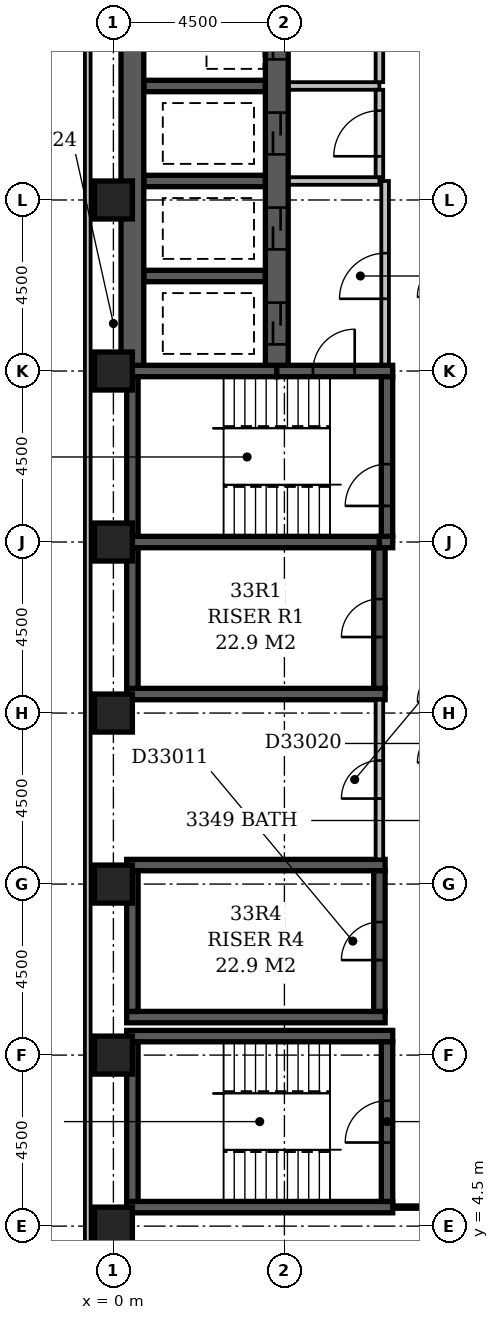
"""IFC4 building model, lengths in metres.
Left out: names, types, materials, properties, quantities, classifications, styles, units other than length and angle.
Written with IfcOpenShell. Run it as: python <this file> out.ifc"""

import sys

from ifc_helpers import new_model, si_unit, direction, frame, frame_2d, origin, origin_2d, place, context, subcontext, project, spatial, rectangle, extrude, element, fill, save


model = new_model("IFC4")
c1 = context("Model", 3, precision=1e-05, world=origin(), true_north=direction((0.0, 1.0)))
c2 = subcontext(c1, "Body", "Model", "MODEL_VIEW")
j1 = project(units=[si_unit("LENGTHUNIT", "METRE"), si_unit("PLANEANGLEUNIT", "RADIAN")], contexts=[c1])
p1 = place(None, origin())
s1 = spatial("IfcSite", under=j1, at=p1, CompositionType="ELEMENT")
p2 = place(p1, origin())
s2 = spatial("IfcBuilding", under=s1, at=p2, CompositionType="ELEMENT")
p3 = place(p2, frame((0.0, 0.0, 134.0)))
s3 = spatial("IfcBuildingStorey", under=s2, at=p3, CompositionType="ELEMENT", Elevation=134.0)
for number, where, z_axis, x_axis in (
    (1, (0.35, 5.0, -0.3), (0.0, 0.0, 1.0), (1.0, 0.0, 0.0)),
    (2, (0.35, 9.5, -0.3), (0.0, 0.0, 1.0), (1.0, 0.0, 0.0)),
):
    element("IfcWall", number, at=place(p3, frame(where, z_axis=z_axis, x_axis=x_axis)), inside=s3, PredefinedType="SHEAR", context=c2, shape_type="SweptSolid", body=[
        extrude(rectangle(XDim=7.0, YDim=0.3, at=frame_2d((3.5, 0.0))), origin(), (0.0, 0.0, 1.0), 3.6),
    ])
for number, where, z_axis, x_axis in (
    (3, (0.35, 10.0, -0.3), (0.0, 0.0, 1.0), (1.0, 0.0, 0.0)),
    (4, (0.35, 14.0, -0.3), (0.0, 0.0, 1.0), (1.0, 0.0, 0.0)),
    (5, (0.35, 18.5, -0.3), (0.0, 0.0, 1.0), (1.0, 0.0, 0.0)),
):
    element("IfcWall", number, at=place(p3, frame(where, z_axis=z_axis, x_axis=x_axis)), inside=s3, PredefinedType="SHEAR", context=c2, shape_type="SweptSolid", body=[
        extrude(rectangle(XDim=6.8, YDim=0.3, at=frame_2d((3.4, 0.0))), origin(), (0.0, 0.0, 1.0), 3.6),
    ])
p4 = place(p3, frame((0.35, 22.5, -0.3), z_axis=(0.0, 0.0, 1.0), x_axis=(1.0, 0.0, 0.0)))
e6 = element("IfcWall", 6, at=p4, inside=s3, PredefinedType="SHEAR", context=c2, shape_type="SweptSolid", body=[
    extrude(rectangle(XDim=6.65, YDim=0.3, at=frame_2d((3.325, 0.0))), origin(), (0.0, 0.0, 1.0), 3.6),
])
p5 = place(p3, frame((0.35, 27.0, -0.3), z_axis=(0.0, 0.0, 1.0), x_axis=(1.0, 0.0, 0.0)))
e7 = element("IfcWall", 7, at=p5, inside=s3, PredefinedType="SHEAR", context=c2, shape_type="SweptSolid", body=[
    extrude(rectangle(XDim=3.95, YDim=0.3, at=frame_2d((1.975, 0.0))), origin(), (0.0, 0.0, 1.0), 3.6),
])
p6 = place(p3, frame((0.5, 5.15, -0.3), z_axis=(0.0, 0.0, 1.0), x_axis=(0.0, 1.0, 0.0)))
e8 = element("IfcWall", 8, at=p6, inside=s3, PredefinedType="SHEAR", context=c2, shape_type="SweptSolid", body=[
    extrude(rectangle(XDim=4.2, YDim=0.3, at=frame_2d((2.1, 0.0))), origin(), (0.0, 0.0, 1.0), 3.6),
])
for number, where, z_axis, x_axis in (
    (9, (0.5, 10.15, -0.3), (0.0, 0.0, 1.0), (0.0, 1.0, 0.0)),
    (10, (0.5, 18.65, -0.3), (0.0, 0.0, 1.0), (0.0, 1.0, 0.0)),
):
    element("IfcWall", number, at=place(p3, frame(where, z_axis=z_axis, x_axis=x_axis)), inside=s3, PredefinedType="SHEAR", context=c2, shape_type="SweptSolid", body=[
        extrude(rectangle(XDim=3.7, YDim=0.3, at=frame_2d((1.85, 0.0))), origin(), (0.0, 0.0, 1.0), 3.6),
    ])
p7 = place(p3, frame((0.5, 22.65, -0.3), z_axis=(0.0, 0.0, 1.0), x_axis=(0.0, 1.0, 0.0)))
e11 = element("IfcWall", 11, at=p7, inside=s3, PredefinedType="SHEAR", context=c2, shape_type="SweptSolid", body=[
    extrude(rectangle(XDim=4.2, YDim=0.3, at=frame_2d((2.1, 0.0))), origin(), (0.0, 0.0, 1.0), 3.6),
])
p8 = place(p3, frame((0.5, 27.15, -0.3), z_axis=(0.0, 0.0, 1.0), x_axis=(0.0, 1.0, 0.0)))
e12 = element("IfcWall", 12, at=p8, inside=s3, PredefinedType="SHEAR", context=c2, shape_type="SweptSolid", body=[
    extrude(rectangle(XDim=22.05, YDim=0.6, at=frame_2d((11.025, 0.0))), origin(), (0.0, 0.0, 1.0), 3.6),
])
for number, where, z_axis, x_axis in (
    (13, (0.8, 29.5, -0.3), (0.0, 0.0, 1.0), (1.0, 0.0, 0.0)),
    (14, (0.8, 32.0, -0.3), (0.0, 0.0, 1.0), (1.0, 0.0, 0.0)),
    (15, (0.8, 34.5, -0.3), (0.0, 0.0, 1.0), (1.0, 0.0, 0.0)),
):
    element("IfcWall", number, at=place(p3, frame(where, z_axis=z_axis, x_axis=x_axis)), inside=s3, PredefinedType="SHEAR", context=c2, shape_type="SweptSolid", body=[
        extrude(rectangle(XDim=3.2, YDim=0.3, at=frame_2d((1.6, 0.0))), origin(), (0.0, 0.0, 1.0), 3.6),
    ])
p9 = place(p3, frame((4.3, 27.0, -0.3), z_axis=(0.0, 0.0, 1.0), x_axis=(1.0, 0.0, 0.0)))
e16 = element("IfcWall", 16, at=p9, inside=s3, PredefinedType="SHEAR", context=c2, shape_type="SweptSolid", body=[
    extrude(rectangle(XDim=3.05, YDim=0.3, at=frame_2d((1.525, 0.0))), origin(), (0.0, 0.0, 1.0), 3.6),
])
p10 = place(p9, frame((0.95, 0.0, 0.3)))
e17 = element("IfcOpeningElement", 17, at=p10, cuts=e16, PredefinedType="OPENING", context=c2, shape_type="SweptSolid", body=[
    extrude(rectangle(XDim=1.1, YDim=2.1, at=frame_2d((0.55, 1.05))), frame((0.0, 0.162, 0.0), z_axis=(0.0, -1.0, 0.0), x_axis=(1.0, 0.0, 0.0)), (0.0, 0.0, 1.0), 0.324),
])
p11 = place(p3, frame((4.3, 27.15, -0.3), z_axis=(0.0, 0.0, 1.0), x_axis=(0.0, 1.0, 0.0)))
e18 = element("IfcWall", 18, at=p11, inside=s3, PredefinedType="SHEAR", context=c2, shape_type="SweptSolid", body=[
    extrude(rectangle(XDim=22.05, YDim=0.6, at=frame_2d((11.025, 0.0))), origin(), (0.0, 0.0, 1.0), 3.6),
])
p12 = place(p11, frame((3.05, 0.0, 0.3)))
e19 = element("IfcOpeningElement", 19, at=p12, cuts=e18, PredefinedType="OPENING", context=c2, shape_type="SweptSolid", body=[
    extrude(rectangle(XDim=1.1, YDim=2.1, at=frame_2d((0.55, 1.05))), frame((0.0, 0.312, 0.0), z_axis=(0.0, -1.0, 0.0), x_axis=(1.0, 0.0, 0.0)), (0.0, 0.0, 1.0), 0.624),
])
p13 = place(p11, frame((0.55, 0.0, 0.3)))
e20 = element("IfcOpeningElement", 20, at=p13, cuts=e18, PredefinedType="OPENING", context=c2, shape_type="SweptSolid", body=[
    extrude(rectangle(XDim=1.1, YDim=2.1, at=frame_2d((0.55, 1.05))), frame((0.0, 0.312, 0.0), z_axis=(0.0, -1.0, 0.0), x_axis=(1.0, 0.0, 0.0)), (0.0, 0.0, 1.0), 0.624),
])
p14 = place(p11, frame((20.55, 0.0, 0.3)))
e21 = element("IfcOpeningElement", 21, at=p14, cuts=e18, PredefinedType="OPENING", context=c2, shape_type="SweptSolid", body=[
    extrude(rectangle(XDim=1.1, YDim=2.1, at=frame_2d((0.55, 1.05))), frame((0.0, 0.312, 0.0), z_axis=(0.0, -1.0, 0.0), x_axis=(1.0, 0.0, 0.0)), (0.0, 0.0, 1.0), 0.624),
])
p15 = place(p11, frame((18.05, 0.0, 0.3)))
e22 = element("IfcOpeningElement", 22, at=p15, cuts=e18, PredefinedType="OPENING", context=c2, shape_type="SweptSolid", body=[
    extrude(rectangle(XDim=1.1, YDim=2.1, at=frame_2d((0.55, 1.05))), frame((0.0, 0.312, 0.0), z_axis=(0.0, -1.0, 0.0), x_axis=(1.0, 0.0, 0.0)), (0.0, 0.0, 1.0), 0.624),
])
p16 = place(p11, frame((15.55, 0.0, 0.3)))
e23 = element("IfcOpeningElement", 23, at=p16, cuts=e18, PredefinedType="OPENING", context=c2, shape_type="SweptSolid", body=[
    extrude(rectangle(XDim=1.1, YDim=2.1, at=frame_2d((0.55, 1.05))), frame((0.0, 0.312, 0.0), z_axis=(0.0, -1.0, 0.0), x_axis=(1.0, 0.0, 0.0)), (0.0, 0.0, 1.0), 0.624),
])
p17 = place(p11, frame((13.05, 0.0, 0.3)))
e24 = element("IfcOpeningElement", 24, at=p17, cuts=e18, PredefinedType="OPENING", context=c2, shape_type="SweptSolid", body=[
    extrude(rectangle(XDim=1.1, YDim=2.1, at=frame_2d((0.55, 1.05))), frame((0.0, 0.312, 0.0), z_axis=(0.0, -1.0, 0.0), x_axis=(1.0, 0.0, 0.0)), (0.0, 0.0, 1.0), 0.624),
])
p18 = place(p11, frame((10.55, 0.0, 0.3)))
e25 = element("IfcOpeningElement", 25, at=p18, cuts=e18, PredefinedType="OPENING", context=c2, shape_type="SweptSolid", body=[
    extrude(rectangle(XDim=1.1, YDim=2.1, at=frame_2d((0.55, 1.05))), frame((0.0, 0.312, 0.0), z_axis=(0.0, -1.0, 0.0), x_axis=(1.0, 0.0, 0.0)), (0.0, 0.0, 1.0), 0.624),
])
p19 = place(p11, frame((8.05, 0.0, 0.3)))
e26 = element("IfcOpeningElement", 26, at=p19, cuts=e18, PredefinedType="OPENING", context=c2, shape_type="SweptSolid", body=[
    extrude(rectangle(XDim=1.1, YDim=2.1, at=frame_2d((0.55, 1.05))), frame((0.0, 0.312, 0.0), z_axis=(0.0, -1.0, 0.0), x_axis=(1.0, 0.0, 0.0)), (0.0, 0.0, 1.0), 0.624),
])
p20 = place(p11, frame((5.55, 0.0, 0.3)))
e27 = element("IfcOpeningElement", 27, at=p20, cuts=e18, PredefinedType="OPENING", context=c2, shape_type="SweptSolid", body=[
    extrude(rectangle(XDim=1.1, YDim=2.1, at=frame_2d((0.55, 1.05))), frame((0.0, 0.312, 0.0), z_axis=(0.0, -1.0, 0.0), x_axis=(1.0, 0.0, 0.0)), (0.0, 0.0, 1.0), 0.624),
])
p21 = place(p3, frame((7.0, 10.15, -0.3), z_axis=(0.0, 0.0, 1.0), x_axis=(0.0, 1.0, 0.0)))
e28 = element("IfcWall", 28, at=p21, inside=s3, PredefinedType="SHEAR", context=c2, shape_type="SweptSolid", body=[
    extrude(rectangle(XDim=3.7, YDim=0.3, at=frame_2d((1.85, 0.0))), origin(), (0.0, 0.0, 1.0), 3.6),
])
p22 = place(p21, frame((1.35, 0.0, 0.3)))
e29 = element("IfcOpeningElement", 29, at=p22, cuts=e28, PredefinedType="OPENING", context=c2, shape_type="SweptSolid", body=[
    extrude(rectangle(XDim=1.0, YDim=2.1, at=frame_2d((0.5, 1.05))), frame((0.0, 0.162, 0.0), z_axis=(0.0, -1.0, 0.0), x_axis=(1.0, 0.0, 0.0)), (0.0, 0.0, 1.0), 0.324),
])
p23 = place(p3, frame((7.0, 18.65, -0.3), z_axis=(0.0, 0.0, 1.0), x_axis=(0.0, 1.0, 0.0)))
e30 = element("IfcWall", 30, at=p23, inside=s3, PredefinedType="SHEAR", context=c2, shape_type="SweptSolid", body=[
    extrude(rectangle(XDim=3.7, YDim=0.3, at=frame_2d((1.85, 0.0))), origin(), (0.0, 0.0, 1.0), 3.6),
])
p24 = place(p23, frame((1.35, 0.0, 0.3)))
e31 = element("IfcOpeningElement", 31, at=p24, cuts=e30, PredefinedType="OPENING", context=c2, shape_type="SweptSolid", body=[
    extrude(rectangle(XDim=1.0, YDim=2.1, at=frame_2d((0.5, 1.05))), frame((0.0, 0.162, 0.0), z_axis=(0.0, -1.0, 0.0), x_axis=(1.0, 0.0, 0.0)), (0.0, 0.0, 1.0), 0.324),
])
p25 = place(p3, frame((7.0, 22.5, -0.3), z_axis=(0.0, 0.0, 1.0), x_axis=(1.0, 0.0, 0.0)))
e32 = element("IfcWall", 32, at=p25, inside=s3, PredefinedType="SHEAR", context=c2, shape_type="SweptSolid", body=[
    extrude(rectangle(XDim=0.35, YDim=0.3, at=frame_2d((0.175, 0.0))), origin(), (0.0, 0.0, 1.0), 3.6),
])
p26 = place(p3, frame((7.2, 5.15, -0.3), z_axis=(0.0, 0.0, 1.0), x_axis=(0.0, 1.0, 0.0)))
e33 = element("IfcWall", 33, at=p26, inside=s3, PredefinedType="SHEAR", context=c2, shape_type="SweptSolid", body=[
    extrude(rectangle(XDim=4.2, YDim=0.3, at=frame_2d((2.1, 0.0))), origin(), (0.0, 0.0, 1.0), 3.6),
])
p27 = place(p26, frame((1.55, 0.0, 0.3)))
e34 = element("IfcOpeningElement", 34, at=p27, cuts=e33, PredefinedType="OPENING", context=c2, shape_type="SweptSolid", body=[
    extrude(rectangle(XDim=1.1, YDim=2.1, at=frame_2d((0.55, 1.05))), frame((0.0, 0.162, 0.0), z_axis=(0.0, -1.0, 0.0), x_axis=(1.0, 0.0, 0.0)), (0.0, 0.0, 1.0), 0.324),
])
p28 = place(p3, frame((7.2, 22.65, -0.3), z_axis=(0.0, 0.0, 1.0), x_axis=(0.0, 1.0, 0.0)))
e35 = element("IfcWall", 35, at=p28, inside=s3, PredefinedType="SHEAR", context=c2, shape_type="SweptSolid", body=[
    extrude(rectangle(XDim=4.2, YDim=0.3, at=frame_2d((2.1, 0.0))), origin(), (0.0, 0.0, 1.0), 3.6),
])
p29 = place(p28, frame((0.8, 0.0, 0.3)))
e36 = element("IfcOpeningElement", 36, at=p29, cuts=e35, PredefinedType="OPENING", context=c2, shape_type="SweptSolid", body=[
    extrude(rectangle(XDim=1.1, YDim=2.1, at=frame_2d((0.55, 1.05))), frame((0.0, 0.162, 0.0), z_axis=(0.0, -1.0, 0.0), x_axis=(1.0, 0.0, 0.0)), (0.0, 0.0, 1.0), 0.324),
])
for number, where, z_axis, x_axis in (
    (37, (0.0, 4.5, -0.3), (0.0, 0.0, 1.0), (1.0, 0.0, 0.0)),
    (38, (0.0, 9.0, -0.3), (0.0, 0.0, 1.0), (1.0, 0.0, 0.0)),
    (39, (0.0, 13.5, -0.3), (0.0, 0.0, 1.0), (1.0, 0.0, 0.0)),
    (40, (0.0, 18.0, -0.3), (0.0, 0.0, 1.0), (1.0, 0.0, 0.0)),
    (41, (0.0, 22.5, -0.3), (0.0, 0.0, 1.0), (1.0, 0.0, 0.0)),
    (42, (0.0, 27.0, -0.3), (0.0, 0.0, 1.0), (1.0, 0.0, 0.0)),
    (43, (0.0, 31.5, -0.3), (0.0, 0.0, 1.0), (1.0, 0.0, 0.0)),
):
    element("IfcColumn", number, at=place(p3, frame(where, z_axis=z_axis, x_axis=x_axis)), inside=s3, PredefinedType="COLUMN", context=c2, shape_type="SweptSolid", body=[
        extrude(rectangle(XDim=1.0, YDim=1.0, at=origin_2d()), origin(), (0.0, 0.0, 1.0), 3.6),
    ])
p30 = place(p3, frame((-0.675, 59.1, 0.0), z_axis=(0.0, 0.0, 1.0), x_axis=(0.0, -1.0, 0.0)))
e44 = element("IfcWall", 44, at=p30, inside=s3, PredefinedType="STANDARD", context=c2, shape_type="SweptSolid", body=[
    extrude(rectangle(XDim=55.35, YDim=0.15, at=frame_2d((27.675, 0.0))), origin(), (0.0, 0.0, 1.0), 2.7),
])
p31 = place(p3, frame((4.62, 34.5, 0.0), z_axis=(0.0, 0.0, 1.0), x_axis=(1.0, 0.0, 0.0)))
e45 = element("IfcWall", 45, at=p31, inside=s3, PredefinedType="PARTITIONING", context=c2, shape_type="SweptSolid", body=[
    extrude(rectangle(XDim=2.38, YDim=0.2, at=frame_2d((1.19, 0.0))), origin(), (0.0, 0.0, 1.0), 3.3),
])
p32 = place(p3, frame((7.0, 34.6, 0.0), z_axis=(0.0, 0.0, 1.0), x_axis=(0.0, 1.0, 0.0)))
e46 = element("IfcWall", 46, at=p32, inside=s3, PredefinedType="PARTITIONING", context=c2, shape_type="SweptSolid", body=[
    extrude(rectangle(XDim=14.9, YDim=0.2, at=frame_2d((7.45, 0.0))), origin(), (0.0, 0.0, 1.0), 3.3),
])
p33 = place(p32, frame((2.8, 0.0, 0.0)))
e47 = element("IfcOpeningElement", 47, at=p33, cuts=e46, PredefinedType="OPENING", context=c2, shape_type="SweptSolid", body=[
    extrude(rectangle(XDim=1.2, YDim=2.1, at=frame_2d((0.6, 1.05))), frame((0.0, 0.112, 0.0), z_axis=(0.0, -1.0, 0.0), x_axis=(1.0, 0.0, 0.0)), (0.0, 0.0, 1.0), 0.224),
])
p34 = place(p32, frame((9.8, 0.0, 0.0)))
e48 = element("IfcOpeningElement", 48, at=p34, cuts=e46, PredefinedType="OPENING", context=c2, shape_type="SweptSolid", body=[
    extrude(rectangle(XDim=1.2, YDim=2.1, at=frame_2d((0.6, 1.05))), frame((0.0, 0.112, 0.0), z_axis=(0.0, -1.0, 0.0), x_axis=(1.0, 0.0, 0.0)), (0.0, 0.0, 1.0), 0.224),
])
p35 = place(p3, frame((4.62, 32.0, 0.0), z_axis=(0.0, 0.0, 1.0), x_axis=(1.0, 0.0, 0.0)))
e49 = element("IfcWall", 49, at=p35, inside=s3, PredefinedType="PARTITIONING", context=c2, shape_type="SweptSolid", body=[
    extrude(rectangle(XDim=2.38, YDim=0.2, at=frame_2d((1.19, 0.0))), origin(), (0.0, 0.0, 1.0), 3.3),
])
p36 = place(p3, frame((7.0, 32.1, 0.0), z_axis=(0.0, 0.0, 1.0), x_axis=(0.0, 1.0, 0.0)))
e50 = element("IfcWall", 50, at=p36, inside=s3, PredefinedType="PARTITIONING", context=c2, shape_type="SweptSolid", body=[
    extrude(rectangle(XDim=2.3, YDim=0.2, at=frame_2d((1.15, 0.0))), origin(), (0.0, 0.0, 1.0), 3.3),
])
p37 = place(p36, frame((0.55, 0.0, 0.0)))
e51 = element("IfcOpeningElement", 51, at=p37, cuts=e50, PredefinedType="OPENING", context=c2, shape_type="SweptSolid", body=[
    extrude(rectangle(XDim=1.2, YDim=2.1, at=frame_2d((0.6, 1.05))), frame((0.0, 0.112, 0.0), z_axis=(0.0, -1.0, 0.0), x_axis=(1.0, 0.0, 0.0)), (0.0, 0.0, 1.0), 0.224),
])
p38 = place(p3, frame((7.15, 27.17, 0.0), z_axis=(0.0, 0.0, 1.0), x_axis=(0.0, 1.0, 0.0)))
e52 = element("IfcWall", 52, at=p38, inside=s3, PredefinedType="PARTITIONING", context=c2, shape_type="SweptSolid", body=[
    extrude(rectangle(XDim=4.83, YDim=0.2, at=frame_2d((2.415, 0.0))), origin(), (0.0, 0.0, 1.0), 3.3),
])
p39 = place(p38, frame((1.73, 0.0, 0.0)))
e53 = element("IfcOpeningElement", 53, at=p39, cuts=e52, PredefinedType="OPENING", context=c2, shape_type="SweptSolid", body=[
    extrude(rectangle(XDim=1.2, YDim=2.1, at=frame_2d((0.6, 1.05))), frame((0.0, 0.112, 0.0), z_axis=(0.0, -1.0, 0.0), x_axis=(1.0, 0.0, 0.0)), (0.0, 0.0, 1.0), 0.224),
])
p40 = place(p3, frame((0.0, 4.5, 0.0), z_axis=(0.0, 0.0, 1.0), x_axis=(0.0, 1.0, 0.0)))
e54 = element("IfcWall", 54, at=p40, inside=s3, PredefinedType="PARTITIONING", context=c2, shape_type="SweptSolid", body=[
    extrude(rectangle(XDim=0.5, YDim=0.1, at=frame_2d((0.25, 0.0))), origin(), (0.0, 0.0, 1.0), 2.7),
])
p41 = place(p3, frame((7.349, 5.0, 0.0), z_axis=(0.0, 0.0, 1.0), x_axis=(1.0, 0.0, 0.0)))
e55 = element("IfcWall", 55, at=p41, inside=s3, PredefinedType="PARTITIONING", context=c2, shape_type="SweptSolid", body=[
    extrude(rectangle(XDim=1.551, YDim=0.1, at=frame_2d((0.775, 0.0))), origin(), (0.0, 0.0, 1.0), 3.3),
])
p42 = place(p3, frame((7.0, 14.15, 0.0), z_axis=(0.0, 0.0, 1.0), x_axis=(0.0, 1.0, 0.0)))
e56 = element("IfcWall", 56, at=p42, inside=s3, PredefinedType="PARTITIONING", context=c2, shape_type="SweptSolid", body=[
    extrude(rectangle(XDim=4.2, YDim=0.2, at=frame_2d((2.1, 0.0))), origin(), (0.0, 0.0, 1.0), 3.3),
])
p43 = place(p42, frame((1.6, 0.0, 0.0)))
e57 = element("IfcOpeningElement", 57, at=p43, cuts=e56, PredefinedType="OPENING", context=c2, shape_type="SweptSolid", body=[
    extrude(rectangle(XDim=1.0, YDim=2.1, at=frame_2d((0.5, 1.05))), frame((0.0, 0.112, 0.0), z_axis=(0.0, -1.0, 0.0), x_axis=(1.0, 0.0, 0.0)), (0.0, 0.0, 1.0), 0.224),
])
p44 = place(p39, origin())
e58 = element("IfcDoor", 58, at=p44, inside=s3, OperationType="SINGLE_SWING_LEFT", PredefinedType="DOOR", context=c2, shape_type="SweptSolid", body=[
    extrude(rectangle(XDim=1.2, YDim=2.1, at=frame_2d((0.6, 1.05))), frame((0.0, 0.025, 0.0), z_axis=(0.0, -1.0, 0.0), x_axis=(1.0, 0.0, 0.0)), (0.0, 0.0, 1.0), 0.05),
])
fill(e53, e58)
p45 = place(p12, origin())
e59 = element("IfcDoor", 59, at=p45, inside=s3, OperationType="SLIDING_TO_LEFT", PredefinedType="DOOR", context=c2, shape_type="SweptSolid", body=[
    extrude(rectangle(XDim=1.1, YDim=2.1, at=frame_2d((0.55, 1.05))), frame((0.0, 0.025, 0.0), z_axis=(0.0, -1.0, 0.0), x_axis=(1.0, 0.0, 0.0)), (0.0, 0.0, 1.0), 0.05),
])
fill(e19, e59)
p46 = place(p13, origin())
e60 = element("IfcDoor", 60, at=p46, inside=s3, OperationType="SLIDING_TO_LEFT", PredefinedType="DOOR", context=c2, shape_type="SweptSolid", body=[
    extrude(rectangle(XDim=1.1, YDim=2.1, at=frame_2d((0.55, 1.05))), frame((0.0, 0.025, 0.0), z_axis=(0.0, -1.0, 0.0), x_axis=(1.0, 0.0, 0.0)), (0.0, 0.0, 1.0), 0.05),
])
fill(e20, e60)
p47 = place(p19, origin())
e61 = element("IfcDoor", 61, at=p47, inside=s3, OperationType="SLIDING_TO_LEFT", PredefinedType="DOOR", context=c2, shape_type="SweptSolid", body=[
    extrude(rectangle(XDim=1.1, YDim=2.1, at=frame_2d((0.55, 1.05))), frame((0.0, 0.025, 0.0), z_axis=(0.0, -1.0, 0.0), x_axis=(1.0, 0.0, 0.0)), (0.0, 0.0, 1.0), 0.05),
])
fill(e26, e61)
p48 = place(p37, origin())
e62 = element("IfcDoor", 62, at=p48, inside=s3, OperationType="SINGLE_SWING_LEFT", PredefinedType="DOOR", context=c2, shape_type="SweptSolid", body=[
    extrude(rectangle(XDim=1.2, YDim=2.1, at=frame_2d((0.6, 1.05))), frame((0.0, 0.025, 0.0), z_axis=(0.0, -1.0, 0.0), x_axis=(1.0, 0.0, 0.0)), (0.0, 0.0, 1.0), 0.05),
])
fill(e51, e62)
p49 = place(p20, origin())
e63 = element("IfcDoor", 63, at=p49, inside=s3, OperationType="SLIDING_TO_LEFT", PredefinedType="DOOR", context=c2, shape_type="SweptSolid", body=[
    extrude(rectangle(XDim=1.1, YDim=2.1, at=frame_2d((0.55, 1.05))), frame((0.0, 0.025, 0.0), z_axis=(0.0, -1.0, 0.0), x_axis=(1.0, 0.0, 0.0)), (0.0, 0.0, 1.0), 0.05),
])
fill(e27, e63)
p50 = place(p24, origin())
e64 = element("IfcDoor", 64, at=p50, inside=s3, OperationType="SINGLE_SWING_LEFT", PredefinedType="DOOR", context=c2, shape_type="SweptSolid", body=[
    extrude(rectangle(XDim=1.0, YDim=2.1, at=frame_2d((0.5, 1.05))), frame((0.0, 0.025, 0.0), z_axis=(0.0, -1.0, 0.0), x_axis=(1.0, 0.0, 0.0)), (0.0, 0.0, 1.0), 0.05),
])
fill(e31, e64)
p51 = place(p22, origin())
e65 = element("IfcDoor", 65, at=p51, inside=s3, OperationType="SINGLE_SWING_LEFT", PredefinedType="DOOR", context=c2, shape_type="SweptSolid", body=[
    extrude(rectangle(XDim=1.0, YDim=2.1, at=frame_2d((0.5, 1.05))), frame((0.0, 0.025, 0.0), z_axis=(0.0, -1.0, 0.0), x_axis=(1.0, 0.0, 0.0)), (0.0, 0.0, 1.0), 0.05),
])
fill(e29, e65)
p52 = place(p10, frame((1.1, 0.0, 0.0), z_axis=(0.0, 0.0, 1.0), x_axis=(-1.0, 0.0, 0.0)))
e66 = element("IfcDoor", 66, at=p52, inside=s3, OperationType="SINGLE_SWING_LEFT", PredefinedType="DOOR", context=c2, shape_type="SweptSolid", body=[
    extrude(rectangle(XDim=1.1, YDim=2.1, at=frame_2d((0.55, 1.05))), frame((0.0, 0.025, 0.0), z_axis=(0.0, -1.0, 0.0), x_axis=(1.0, 0.0, 0.0)), (0.0, 0.0, 1.0), 0.05),
])
fill(e17, e66)
p53 = place(p29, origin())
e67 = element("IfcDoor", 67, at=p53, inside=s3, OperationType="SINGLE_SWING_LEFT", PredefinedType="DOOR", context=c2, shape_type="SweptSolid", body=[
    extrude(rectangle(XDim=1.1, YDim=2.1, at=frame_2d((0.55, 1.05))), frame((0.0, 0.025, 0.0), z_axis=(0.0, -1.0, 0.0), x_axis=(1.0, 0.0, 0.0)), (0.0, 0.0, 1.0), 0.05),
])
fill(e36, e67)
p54 = place(p27, origin())
e68 = element("IfcDoor", 68, at=p54, inside=s3, OperationType="SINGLE_SWING_LEFT", PredefinedType="DOOR", context=c2, shape_type="SweptSolid", body=[
    extrude(rectangle(XDim=1.1, YDim=2.1, at=frame_2d((0.55, 1.05))), frame((0.0, 0.025, 0.0), z_axis=(0.0, -1.0, 0.0), x_axis=(1.0, 0.0, 0.0)), (0.0, 0.0, 1.0), 0.05),
])
fill(e34, e68)
p55 = place(p43, origin())
e69 = element("IfcDoor", 69, at=p55, inside=s3, OperationType="SINGLE_SWING_LEFT", PredefinedType="DOOR", context=c2, shape_type="SweptSolid", body=[
    extrude(rectangle(XDim=1.0, YDim=2.1, at=frame_2d((0.5, 1.05))), frame((0.0, 0.025, 0.0), z_axis=(0.0, -1.0, 0.0), x_axis=(1.0, 0.0, 0.0)), (0.0, 0.0, 1.0), 0.05),
])
fill(e57, e69)
save(model, sys.argv[1])
